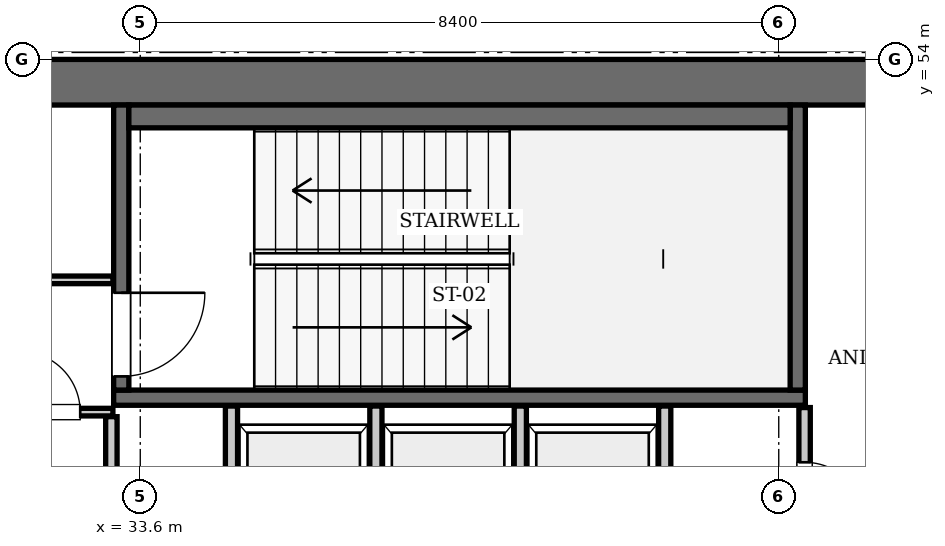
"""IFC4 building model, lengths in metres.
Left out: names, types, materials, properties, quantities, classifications, styles, units other than length and angle.
Written with IfcOpenShell. Run it as: python <this file> out.ifc"""

import sys

from ifc_helpers import new_model, si_unit, direction, frame, frame_2d, origin, place, context, subcontext, project, spatial, rectangle, extrude, element, fill, save


model = new_model("IFC4")
c1 = context("Model", 3, precision=1e-05, world=origin(), true_north=direction((0.0, 1.0)))
c2 = subcontext(c1, "Body", "Model", "MODEL_VIEW")
j1 = project(units=[si_unit("LENGTHUNIT", "METRE"), si_unit("PLANEANGLEUNIT", "RADIAN")], contexts=[c1])
p1 = place(None, origin())
s1 = spatial("IfcSite", under=j1, at=p1, CompositionType="ELEMENT")
p2 = place(p1, origin())
s2 = spatial("IfcBuilding", under=s1, at=p2, CompositionType="ELEMENT")
p3 = place(p2, frame((0.0, 0.0, 349.65)))
s3 = spatial("IfcBuildingStorey", under=s2, at=p3, CompositionType="ELEMENT", Elevation=349.65)
p4 = place(p3, frame((25.2, 53.7, 0.0), z_axis=(0.0, 0.0, 1.0), x_axis=(1.0, 0.0, 0.0)))
e1 = element("IfcWall", 1, at=p4, inside=s3, PredefinedType="SHEAR", context=c2, shape_type="SweptSolid", body=[
    extrude(rectangle(XDim=25.2, YDim=0.6, at=frame_2d((12.6, 0.0))), origin(), (0.0, 0.0, 1.0), 4.55),
])
p5 = place(p3, frame((33.25, 49.55, 0.0), z_axis=(0.0, 0.0, 1.0), x_axis=(1.0, 0.0, 0.0)))
e2 = element("IfcWall", 2, at=p5, inside=s3, PredefinedType="SOLIDWALL", context=c2, shape_type="SweptSolid", body=[
    extrude(rectangle(XDim=9.1, YDim=0.2, at=frame_2d((4.55, 0.0))), origin(), (0.0, 0.0, 1.0), 4.29),
])
p6 = place(p3, frame((42.25, 49.65, 0.0), z_axis=(0.0, 0.0, 1.0), x_axis=(0.0, 1.0, 0.0)))
e3 = element("IfcWall", 3, at=p6, inside=s3, PredefinedType="SOLIDWALL", context=c2, shape_type="SweptSolid", body=[
    extrude(rectangle(XDim=3.75, YDim=0.2, at=frame_2d((1.875, 0.0))), origin(), (0.0, 0.0, 1.0), 4.29),
])
p7 = place(p3, frame((33.35, 49.65, 0.0), z_axis=(0.0, 0.0, 1.0), x_axis=(0.0, 1.0, 0.0)))
e4 = element("IfcWall", 4, at=p7, inside=s3, PredefinedType="SOLIDWALL", context=c2, shape_type="SweptSolid", body=[
    extrude(rectangle(XDim=3.75, YDim=0.2, at=frame_2d((1.875, 0.0))), origin(), (0.0, 0.0, 1.0), 4.29),
])
p8 = place(p7, frame((0.18, 0.0, 0.0)))
e5 = element("IfcOpeningElement", 5, at=p8, cuts=e4, PredefinedType="OPENING", context=c2, shape_type="SweptSolid", body=[
    extrude(rectangle(XDim=1.1, YDim=2.15, at=frame_2d((0.55, 1.075))), frame((0.0, 0.11, 0.0), z_axis=(0.0, -1.0, 0.0), x_axis=(1.0, 0.0, 0.0)), (0.0, 0.0, 1.0), 0.22),
])
p9 = place(p3, frame((33.45, 53.25, 0.0), z_axis=(0.0, 0.0, 1.0), x_axis=(1.0, 0.0, 0.0)))
e6 = element("IfcWall", 6, at=p9, inside=s3, PredefinedType="SOLIDWALL", context=c2, shape_type="SweptSolid", body=[
    extrude(rectangle(XDim=8.7, YDim=0.3, at=frame_2d((4.35, 0.0))), origin(), (0.0, 0.0, 1.0), 4.29),
])
for number, where, z_axis, x_axis in (
    (7, (34.8, 47.25, 0.0), (0.0, 0.0, 1.0), (0.0, 1.0, 0.0)),
    (8, (36.7, 47.25, 0.0), (0.0, 0.0, 1.0), (0.0, 1.0, 0.0)),
    (9, (38.6, 47.25, 0.0), (0.0, 0.0, 1.0), (0.0, 1.0, 0.0)),
    (10, (40.5, 47.25, 0.0), (0.0, 0.0, 1.0), (0.0, 1.0, 0.0)),
):
    element("IfcWall", number, at=place(p3, frame(where, z_axis=z_axis, x_axis=x_axis)), inside=s3, PredefinedType="SOLIDWALL", context=c2, shape_type="SweptSolid", body=[
        extrude(rectangle(XDim=2.19, YDim=0.16, at=frame_2d((1.095, 0.0))), origin(), (0.0, 0.0, 1.0), 4.29),
    ])
p10 = place(p3, frame((33.22, 45.14, 0.0), z_axis=(0.0, 0.0, 1.0), x_axis=(0.0, 1.0, 0.0)))
e11 = element("IfcWall", 11, at=p10, inside=s3, PredefinedType="PARTITIONING", context=c2, shape_type="SweptSolid", body=[
    extrude(rectangle(XDim=4.16, YDim=0.15, at=frame_2d((2.08, 0.0))), origin(), (0.0, 0.0, 1.0), 4.29),
])
p11 = place(p3, frame((30.06, 49.36, 0.0), z_axis=(0.0, 0.0, 1.0), x_axis=(1.0, 0.0, 0.0)))
e12 = element("IfcWall", 12, at=p11, inside=s3, PredefinedType="PARTITIONING", context=c2, shape_type="SweptSolid", body=[
    extrude(rectangle(XDim=3.18, YDim=0.1, at=frame_2d((1.59, 0.0))), origin(), (0.0, 0.0, 1.0), 4.29),
])
p12 = place(p11, frame((1.95, 0.0, 0.0)))
e13 = element("IfcOpeningElement", 13, at=p12, cuts=e12, PredefinedType="OPENING", context=c2, shape_type="SweptSolid", body=[
    extrude(rectangle(XDim=0.8, YDim=2.05, at=frame_2d((0.4, 1.025))), frame((0.0, 0.06, 0.0), z_axis=(0.0, -1.0, 0.0), x_axis=(1.0, 0.0, 0.0)), (0.0, 0.0, 1.0), 0.12),
])
p13 = place(p3, frame((31.82, 51.1, 0.0), z_axis=(0.0, 0.0, 1.0), x_axis=(1.0, 0.0, 0.0)))
e14 = element("IfcWall", 14, at=p13, inside=s3, PredefinedType="PARTITIONING", context=c2, shape_type="SweptSolid", body=[
    extrude(rectangle(XDim=1.42, YDim=0.1, at=frame_2d((0.71, 0.0))), origin(), (0.0, 0.0, 1.0), 4.29),
])
p14 = place(p3, frame((42.34, 47.66, 0.0), z_axis=(0.0, 0.0, 1.0), x_axis=(0.0, 1.0, 0.0)))
e15 = element("IfcWall", 15, at=p14, inside=s3, PredefinedType="PARTITIONING", context=c2, shape_type="SweptSolid", body=[
    extrude(rectangle(XDim=1.76, YDim=0.15, at=frame_2d((0.88, 0.0))), origin(), (0.0, 0.0, 1.0), 4.29),
])
p15 = place(p14, frame((0.24, 0.0, 0.0)))
e16 = element("IfcOpeningElement", 16, at=p15, cuts=e15, PredefinedType="OPENING", context=c2, shape_type="SweptSolid", body=[
    extrude(rectangle(XDim=0.8, YDim=2.05, at=frame_2d((0.4, 1.025))), frame((0.0, 0.085, 0.0), z_axis=(0.0, -1.0, 0.0), x_axis=(1.0, 0.0, 0.0)), (0.0, 0.0, 1.0), 0.17),
])
p16 = place(p8, frame((1.1, 0.0, 0.0), z_axis=(0.0, 0.0, 1.0), x_axis=(-1.0, 0.0, 0.0)))
e17 = element("IfcDoor", 17, at=p16, inside=s3, OperationType="SINGLE_SWING_LEFT", PredefinedType="DOOR", context=c2, shape_type="SweptSolid", body=[
    extrude(rectangle(XDim=1.1, YDim=2.15, at=frame_2d((0.55, 1.075))), frame((0.0, 0.025, 0.0), z_axis=(0.0, -1.0, 0.0), x_axis=(1.0, 0.0, 0.0)), (0.0, 0.0, 1.0), 0.05),
])
fill(e5, e17)
p17 = place(p12, origin())
e18 = element("IfcDoor", 18, at=p17, inside=s3, OperationType="SINGLE_SWING_LEFT", PredefinedType="DOOR", context=c2, shape_type="SweptSolid", body=[
    extrude(rectangle(XDim=0.8, YDim=2.05, at=frame_2d((0.4, 1.025))), frame((0.0, 0.025, 0.0), z_axis=(0.0, -1.0, 0.0), x_axis=(1.0, 0.0, 0.0)), (0.0, 0.0, 1.0), 0.05),
])
fill(e13, e18)
p18 = place(p15, frame((0.8, 0.0, 0.0), z_axis=(0.0, 0.0, 1.0), x_axis=(-1.0, 0.0, 0.0)))
e19 = element("IfcDoor", 19, at=p18, inside=s3, OperationType="SINGLE_SWING_RIGHT", PredefinedType="DOOR", context=c2, shape_type="SweptSolid", body=[
    extrude(rectangle(XDim=0.8, YDim=2.05, at=frame_2d((0.4, 1.025))), frame((0.0, 0.025, 0.0), z_axis=(0.0, -1.0, 0.0), x_axis=(1.0, 0.0, 0.0)), (0.0, 0.0, 1.0), 0.05),
])
fill(e16, e19)
save(model, sys.argv[1])
